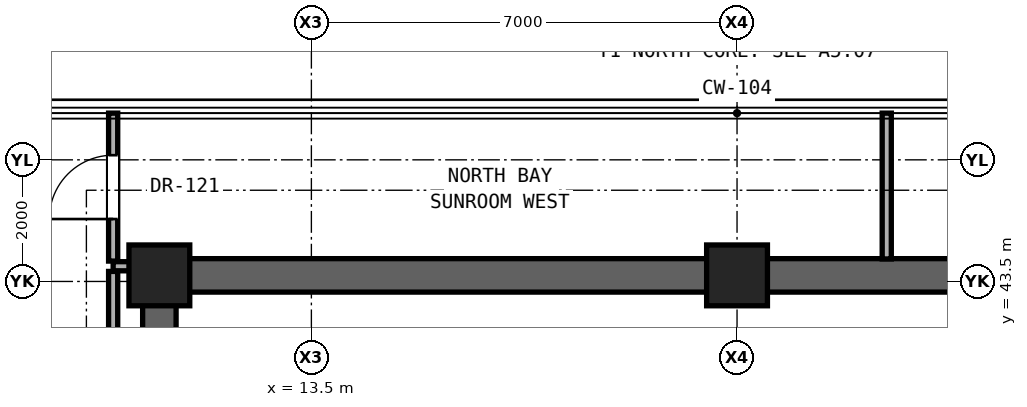
"""IFC4 building model, lengths in metres.
Left out: names, types, materials, properties, quantities, classifications, styles, units other than length and angle.
Written with IfcOpenShell. Run it as: python <this file> out.ifc"""

import sys

from ifc_helpers import new_model, si_unit, direction, frame, frame_2d, origin, origin_2d, place, context, subcontext, project, spatial, rectangle, extrude, element, fill, save


model = new_model("IFC4")
c1 = context("Model", 3, precision=1e-05, world=origin(), true_north=direction((0.0, 1.0)))
c2 = subcontext(c1, "Body", "Model", "MODEL_VIEW")
j1 = project(units=[si_unit("LENGTHUNIT", "METRE"), si_unit("PLANEANGLEUNIT", "RADIAN")], contexts=[c1])
p1 = place(None, origin())
s1 = spatial("IfcSite", under=j1, at=p1, CompositionType="ELEMENT")
p2 = place(p1, origin())
s2 = spatial("IfcBuilding", under=s1, at=p2, CompositionType="ELEMENT")
p3 = place(p2, frame((0.0, 0.0, 157.65)))
s3 = spatial("IfcBuildingStorey", under=s2, at=p3, CompositionType="ELEMENT", Elevation=157.65)
for number, where, z_axis, x_axis in (
    (1, (11.0, 43.6, 0.0), (0.0, 0.0, 1.0), (1.0, 0.0, 0.0)),
    (2, (20.5, 43.6, 0.0), (0.0, 0.0, 1.0), (1.0, 0.0, 0.0)),
):
    element("IfcColumn", number, at=place(p3, frame(where, z_axis=z_axis, x_axis=x_axis)), inside=s3, PredefinedType="COLUMN", context=c2, shape_type="SweptSolid", body=[
        extrude(rectangle(XDim=1.0, YDim=1.0, at=origin_2d()), origin(), (0.0, 0.0, 1.0), 3.25),
    ])
p4 = place(p3, frame((11.0, 43.6, 0.0), z_axis=(0.0, 0.0, 1.0), x_axis=(1.0, 0.0, 0.0)))
e3 = element("IfcWall", 3, at=p4, inside=s3, PredefinedType="SHEAR", context=c2, shape_type="SweptSolid", body=[
    extrude(rectangle(XDim=19.0, YDim=0.55, at=frame_2d((9.5, 0.0))), origin(), (0.0, 0.0, 1.0), 3.05),
])
p5 = place(p3, frame((11.0, 37.6, 0.0), z_axis=(0.0, 0.0, 1.0), x_axis=(0.0, 1.0, 0.0)))
e4 = element("IfcWall", 4, at=p5, inside=s3, PredefinedType="SHEAR", context=c2, shape_type="SweptSolid", body=[
    extrude(rectangle(XDim=6.0, YDim=0.55, at=frame_2d((3.0, 0.0))), origin(), (0.0, 0.0, 1.0), 3.05),
])
p6 = place(p3, frame((10.24, 43.75, 0.0), z_axis=(0.0, 0.0, 1.0), x_axis=(1.0, 0.0, 0.0)))
e5 = element("IfcWall", 5, at=p6, inside=s3, PredefinedType="PARTITIONING", context=c2, shape_type="SweptSolid", body=[
    extrude(rectangle(XDim=0.49, YDim=0.15, at=frame_2d((0.245, 0.0))), origin(), (0.0, 0.0, 1.0), 3.05),
])
p7 = place(p3, frame((10.24, 34.535, 0.0), z_axis=(0.0, 0.0, 1.0), x_axis=(0.0, 1.0, 0.0)))
e6 = element("IfcWall", 6, at=p7, inside=s3, PredefinedType="PARTITIONING", context=c2, shape_type="SweptSolid", body=[
    extrude(rectangle(XDim=9.13, YDim=0.15, at=frame_2d((4.565, 0.0))), origin(), (0.0, 0.0, 1.0), 2.442),
])
p8 = place(p3, frame((10.24, 43.835, 0.0), z_axis=(0.0, 0.0, 1.0), x_axis=(0.0, 1.0, 0.0)))
e7 = element("IfcWall", 7, at=p8, inside=s3, PredefinedType="PARTITIONING", context=c2, shape_type="SweptSolid", body=[
    extrude(rectangle(XDim=2.433, YDim=0.15, at=frame_2d((1.217, 0.0))), origin(), (0.0, 0.0, 1.0), 3.05),
])
p9 = place(p8, frame((0.691, 0.0, 0.0)))
e8 = element("IfcOpeningElement", 8, at=p9, cuts=e7, PredefinedType="OPENING", context=c2, shape_type="SweptSolid", body=[
    extrude(rectangle(XDim=1.05, YDim=2.2, at=frame_2d((0.525, 1.1))), frame((0.0, 0.085, 0.0), z_axis=(0.0, -1.0, 0.0), x_axis=(1.0, 0.0, 0.0)), (0.0, 0.0, 1.0), 0.17),
])
p10 = place(p3, frame((22.962, 43.87, 0.0), z_axis=(0.0, 0.0, 1.0), x_axis=(0.0, 1.0, 0.0)))
e9 = element("IfcWall", 9, at=p10, inside=s3, PredefinedType="PARTITIONING", context=c2, shape_type="SweptSolid", body=[
    extrude(rectangle(XDim=2.398, YDim=0.15, at=frame_2d((1.199, 0.0))), origin(), (0.0, 0.0, 1.0), 3.05),
])
p11 = place(p9, origin())
e10 = element("IfcDoor", 10, at=p11, inside=s3, OperationType="SINGLE_SWING_LEFT", PredefinedType="DOOR", context=c2, shape_type="SweptSolid", body=[
    extrude(rectangle(XDim=1.05, YDim=2.2, at=frame_2d((0.525, 1.1))), frame((0.0, 0.025, 0.0), z_axis=(0.0, -1.0, 0.0), x_axis=(1.0, 0.0, 0.0)), (0.0, 0.0, 1.0), 0.05),
])
fill(e8, e10)
save(model, sys.argv[1])
